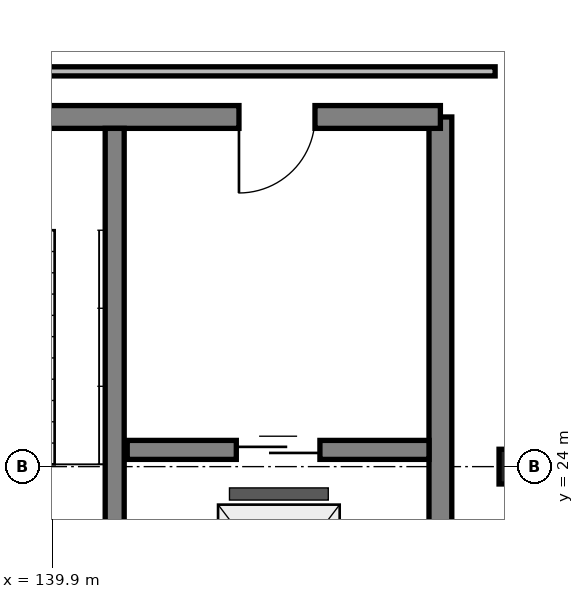
"""IFC4 building model, lengths in metres.
Left out: names, types, materials, properties, quantities, classifications, styles, units other than length and angle.
Written with IfcOpenShell. Run it as: python <this file> out.ifc"""

import sys

from ifc_helpers import new_model, si_unit, direction, frame, frame_2d, origin, origin_2d_with_axis, place, context, subcontext, project, spatial, rectangle, hollow_circle, extrude, element, fill, save


model = new_model("IFC4")
c1 = context("Model", 3, precision=1e-05, world=origin(), true_north=direction((0.0, 1.0)))
c2 = subcontext(c1, "Body", "Model", "MODEL_VIEW")
j1 = project(units=[si_unit("LENGTHUNIT", "METRE"), si_unit("PLANEANGLEUNIT", "RADIAN")], contexts=[c1])
p1 = place(None, origin())
s1 = spatial("IfcSite", under=j1, at=p1, CompositionType="ELEMENT")
p2 = place(p1, origin())
s2 = spatial("IfcBuilding", under=s1, at=p2, CompositionType="ELEMENT")
p3 = place(p2, frame((0.0, 0.0, -4.5)))
s3 = spatial("IfcBuildingStorey", under=s2, at=p3, CompositionType="ELEMENT", Elevation=-4.5)
p4 = place(p3, frame((146.0, 24.0, -0.45), z_axis=(0.0, 0.0, 1.0), x_axis=(1.0, 0.0, 0.0)))
e1 = element("IfcColumn", 1, at=p4, inside=s3, PredefinedType="COLUMN", context=c2, shape_type="SweptSolid", body=[
    extrude(hollow_circle(Radius=0.229, WallThickness=0.013, at=origin_2d_with_axis()), origin(), (0.0, 0.0, 1.0), 4.95),
])
p5 = place(p3, frame((145.0, 20.6, 0.0), z_axis=(0.0, 0.0, 1.0), x_axis=(0.0, 1.0, 0.0)))
e2 = element("IfcWall", 2, at=p5, inside=s3, PredefinedType="SHEAR", context=c2, shape_type="SweptSolid", body=[
    extrude(rectangle(XDim=8.0, YDim=0.3, at=frame_2d((4.0, 0.0), x_axis=(1.0, 0.0))), origin(), (0.0, 0.0, 1.0), 4.5),
])
p6 = place(p3, frame((145.0, 28.6, 0.0), z_axis=(0.0, 0.0, 1.0), x_axis=(-1.0, 0.0, 0.0)))
e3 = element("IfcWall", 3, at=p6, inside=s3, PredefinedType="SHEAR", context=c2, shape_type="SweptSolid", body=[
    extrude(rectangle(XDim=7.4, YDim=0.3, at=frame_2d((3.7, 0.0), x_axis=(1.0, 0.0))), origin(), (0.0, 0.0, 1.0), 4.5),
])
p7 = place(p6, frame((1.65, 0.0, 0.0)))
e4 = element("IfcOpeningElement", 4, at=p7, cuts=e3, PredefinedType="OPENING", context=c2, shape_type="SweptSolid", body=[
    extrude(rectangle(XDim=1.0, YDim=2.15, at=frame_2d((0.5, 1.075), x_axis=(1.0, 0.0))), frame((0.0, 0.16, 0.0), z_axis=(0.0, -1.0, 0.0), x_axis=(1.0, 0.0, 0.0)), (0.0, 0.0, 1.0), 0.32),
])
p8 = place(p6, frame((5.3, 0.0, 0.0)))
e5 = element("IfcOpeningElement", 5, at=p8, cuts=e3, PredefinedType="OPENING", context=c2, shape_type="SweptSolid", body=[
    extrude(rectangle(XDim=1.0, YDim=2.15, at=frame_2d((0.5, 1.075), x_axis=(1.0, 0.0))), frame((0.0, 0.16, 0.0), z_axis=(0.0, -1.0, 0.0), x_axis=(1.0, 0.0, 0.0)), (0.0, 0.0, 1.0), 0.32),
])
p9 = place(p3, frame((140.715, 20.75, 0.0), z_axis=(0.0, 0.0, 1.0), x_axis=(0.0, 1.0, 0.0)))
e6 = element("IfcWall", 6, at=p9, inside=s3, PredefinedType="SHEAR", context=c2, shape_type="SweptSolid", body=[
    extrude(rectangle(XDim=7.7, YDim=0.25, at=frame_2d((3.85, 0.0), x_axis=(1.0, 0.0))), origin(), (0.0, 0.0, 1.0), 4.5),
])
p10 = place(p3, frame((140.88, 24.22, 0.0), z_axis=(0.0, 0.0, 1.0), x_axis=(1.0, 0.0, 0.0)))
e7 = element("IfcWall", 7, at=p10, inside=s3, PredefinedType="SHEAR", context=c2, shape_type="SweptSolid", body=[
    extrude(rectangle(XDim=3.97, YDim=0.25, at=frame_2d((1.985, 0.0), x_axis=(1.0, 0.0))), origin(), (0.0, 0.0, 1.0), 4.2),
])
p11 = place(p10, frame((1.435, 0.0, 0.0)))
e8 = element("IfcOpeningElement", 8, at=p11, cuts=e7, PredefinedType="OPENING", context=c2, shape_type="SweptSolid", body=[
    extrude(rectangle(XDim=1.1, YDim=2.15, at=frame_2d((0.55, 1.075), x_axis=(1.0, 0.0))), frame((0.0, 0.135, 0.0), z_axis=(0.0, -1.0, 0.0), x_axis=(1.0, 0.0, 0.0)), (0.0, 0.0, 1.0), 0.27),
])
p12 = place(p3, frame((136.28, 29.2, 0.0), z_axis=(0.0, 0.0, 1.0), x_axis=(1.0, 0.0, 0.0)))
e9 = element("IfcWall", 9, at=p12, inside=s3, PredefinedType="PARTITIONING", context=c2, shape_type="SweptSolid", body=[
    extrude(rectangle(XDim=9.44, YDim=0.12, at=frame_2d((4.72, 0.0), x_axis=(1.0, 0.0))), origin(), (0.0, 0.0, 1.0), 3.58),
])
p13 = place(p7, origin())
e10 = element("IfcDoor", 10, at=p13, inside=s3, OperationType="SINGLE_SWING_RIGHT", PredefinedType="DOOR", context=c2, shape_type="SweptSolid", body=[
    extrude(rectangle(XDim=1.0, YDim=2.15, at=frame_2d((0.5, 1.075), x_axis=(1.0, 0.0))), frame((0.0, 0.025, 0.0), z_axis=(0.0, -1.0, 0.0), x_axis=(1.0, 0.0, 0.0)), (0.0, 0.0, 1.0), 0.05),
])
fill(e4, e10)
p14 = place(p11, origin())
e11 = element("IfcDoor", 11, at=p14, inside=s3, OperationType="SLIDING_TO_LEFT", PredefinedType="DOOR", context=c2, shape_type="SweptSolid", body=[
    extrude(rectangle(XDim=1.1, YDim=2.15, at=frame_2d((0.55, 1.075), x_axis=(1.0, 0.0))), frame((0.0, 0.025, 0.0), z_axis=(0.0, -1.0, 0.0), x_axis=(1.0, 0.0, 0.0)), (0.0, 0.0, 1.0), 0.05),
])
fill(e8, e11)
save(model, sys.argv[1])
